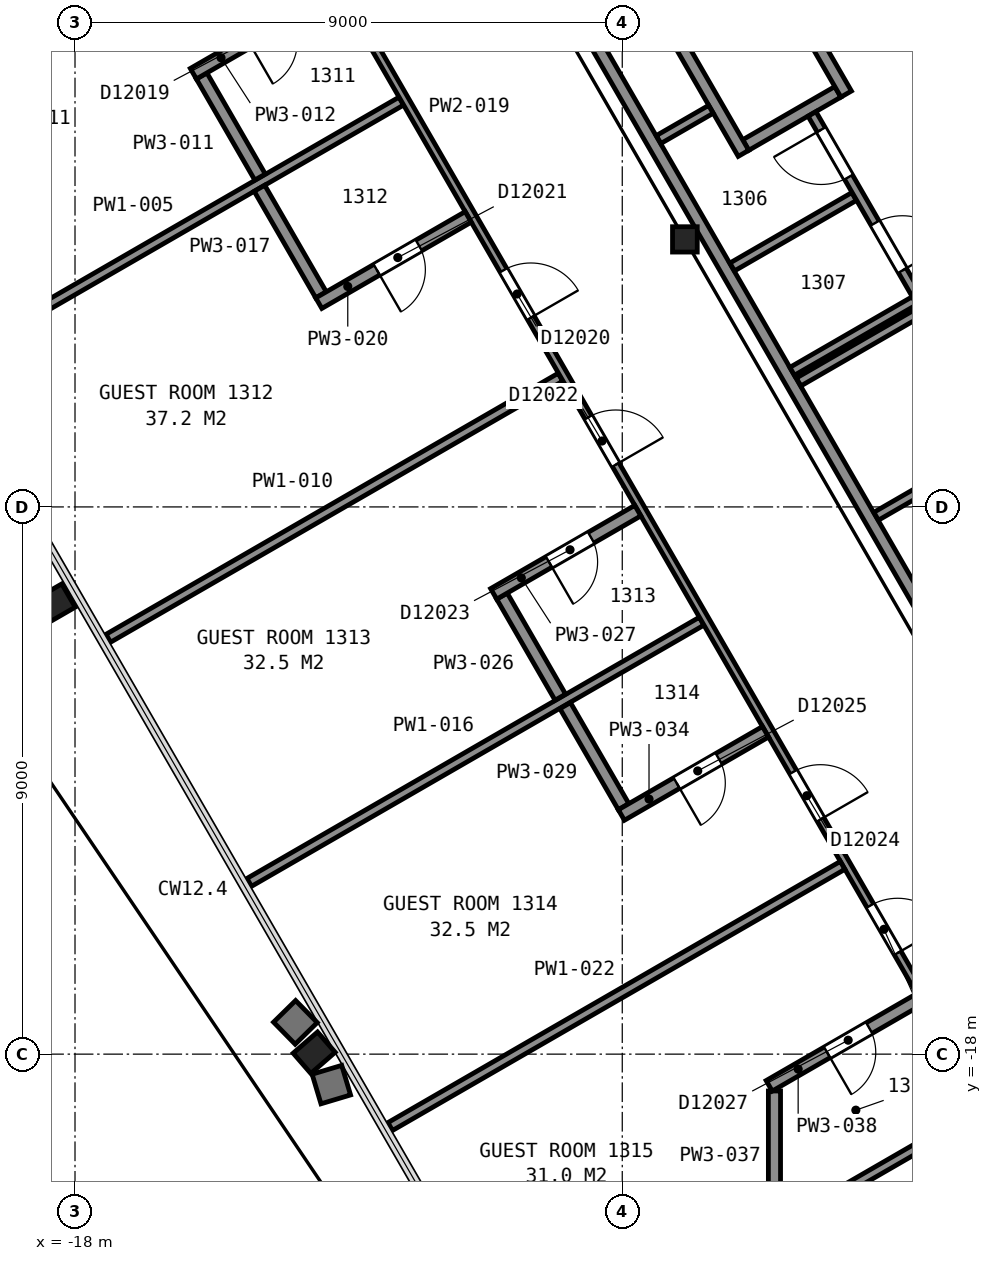
"""IFC4 building model, lengths in metres.
Left out: names, types, materials, properties, quantities, classifications, styles, units other than length and angle.
Written with IfcOpenShell. Run it as: python <this file> out.ifc"""

import sys

from ifc_helpers import new_model, si_unit, direction, frame, frame_2d, origin, origin_2d, place, context, subcontext, project, spatial, rectangle, i_section, extrude, element, fill, save


model = new_model("IFC4")
c1 = context("Model", 3, precision=1e-05, world=origin(), true_north=direction((0.0, 1.0)))
c2 = subcontext(c1, "Body", "Model", "MODEL_VIEW")
j1 = project(units=[si_unit("LENGTHUNIT", "METRE"), si_unit("PLANEANGLEUNIT", "RADIAN")], contexts=[c1])
p1 = place(None, origin())
s1 = spatial("IfcSite", under=j1, at=p1, CompositionType="ELEMENT")
p2 = place(p1, origin())
s2 = spatial("IfcBuilding", under=s1, at=p2, CompositionType="ELEMENT")
p3 = place(p2, frame((0.0, 0.0, 62.0)))
s3 = spatial("IfcBuildingStorey", under=s2, at=p3, CompositionType="ELEMENT", Elevation=62.0)
p4 = place(p3, frame((-18.252, -10.541, 0.025), z_axis=(-0.072028126388, -0.041530965358, 0.996537569751), x_axis=(-0.499785583529, 0.866149161394, -2.670081e-05)))
e1 = element("IfcColumn", 1, at=p4, inside=s3, PredefinedType="COLUMN", context=c2, shape_type="SweptSolid", body=[
    extrude(i_section(OverallWidth=0.442, OverallDepth=0.531, WebThickness=0.066, FlangeThickness=0.106, FilletRadius=0.015, at=origin_2d()), origin(), (0.0, 0.0, 1.0), 3.562),
])
p5 = place(p3, frame((-13.992, -17.911, 0.025), z_axis=(-0.063660519168, -0.055368890729, 0.996434455566), x_axis=(-0.500027144747, 0.865858806591, 0.01616729924)))
e2 = element("IfcColumn", 2, at=p5, inside=s3, PredefinedType="COLUMN", context=c2, shape_type="SweptSolid", body=[
    extrude(i_section(OverallWidth=0.442, OverallDepth=0.531, WebThickness=0.066, FlangeThickness=0.106, FilletRadius=0.015, at=origin_2d()), origin(), (0.0, 0.0, 1.0), 3.563),
])
p6 = place(p3, frame((-7.97, -4.6, 0.0), z_axis=(0.0, 0.0, 1.0), x_axis=(1.0, 0.0, 0.0)))
e3 = element("IfcColumn", 3, at=p6, inside=s3, PredefinedType="COLUMN", context=c2, shape_type="SweptSolid", body=[
    extrude(i_section(OverallWidth=0.406, OverallDepth=0.417, WebThickness=0.03, FlangeThickness=0.048, FilletRadius=0.015, at=origin_2d()), origin(), (0.0, 0.0, 1.0), 3.6),
])
p7 = place(p3, frame((-6.97, -3.048, 0.0), z_axis=(0.0, 0.0, 1.0), x_axis=(0.866036909293, 0.499980071345, 0.0)))
e4 = element("IfcWall", 4, at=p7, inside=s3, PredefinedType="PARTITIONING", context=c2, shape_type="SweptSolid", body=[
    extrude(rectangle(XDim=1.75, YDim=0.2, at=frame_2d((0.875, 0.0))), origin(), (0.0, 0.0, 1.0), 3.6),
])
p8 = place(p3, frame((-5.318, -2.21, 0.0), z_axis=(0.0, 0.0, 1.0), x_axis=(-0.499938297808, 0.866061024631, 0.0)))
e5 = element("IfcWall", 5, at=p8, inside=s3, PredefinedType="PARTITIONING", context=c2, shape_type="SweptSolid", body=[
    extrude(rectangle(XDim=2.35, YDim=0.2, at=frame_2d((1.175, 0.0))), origin(), (0.0, 0.0, 1.0), 3.6),
])
p9 = place(p3, frame((-7.006, -3.185, 0.0), z_axis=(0.0, 0.0, 1.0), x_axis=(-0.499990435942, 0.866030925526, 0.0)))
e6 = element("IfcWall", 6, at=p9, inside=s3, PredefinedType="PARTITIONING", context=c2, shape_type="SweptSolid", body=[
    extrude(rectangle(XDim=2.55, YDim=0.2, at=frame_2d((1.275, 0.0))), origin(), (0.0, 0.0, 1.0), 3.6),
])
p10 = place(p3, frame((-13.664, 5.946, 0.0), z_axis=(0.0, 0.0, 1.0), x_axis=(0.499994327219, -0.866028678941, 0.0)))
e7 = element("IfcWall", 7, at=p10, inside=s3, PredefinedType="PARTITIONING", context=c2, shape_type="SweptSolid", body=[
    extrude(rectangle(XDim=23.968, YDim=0.2, at=frame_2d((11.984, 0.0))), origin(), (0.0, 0.0, 1.0), 3.35),
])
p11 = place(p3, frame((-8.402, -2.958, 0.0), z_axis=(0.0, 0.0, 1.0), x_axis=(0.866025935826, 0.499999078476, 0.0)))
e8 = element("IfcWall", 8, at=p11, inside=s3, PredefinedType="PARTITIONING", context=c2, shape_type="SweptSolid", body=[
    extrude(rectangle(XDim=0.993, YDim=0.15, at=frame_2d((0.497, 0.0))), origin(), (0.0, 0.0, 1.0), 3.35),
])
p12 = place(p3, frame((-7.192, -5.053, 0.0), z_axis=(0.0, 0.0, 1.0), x_axis=(0.865851878631, 0.500300434011, 0.0)))
e9 = element("IfcWall", 9, at=p12, inside=s3, PredefinedType="PARTITIONING", context=c2, shape_type="SweptSolid", body=[
    extrude(rectangle(XDim=2.315, YDim=0.15, at=frame_2d((1.158, 0.0))), origin(), (0.0, 0.0, 1.0), 3.35),
])
p13 = place(p3, frame((-6.206, -6.77, 0.0), z_axis=(0.0, 0.0, 1.0), x_axis=(0.865998469481, 0.500046648681, 0.0)))
e10 = element("IfcWall", 10, at=p13, inside=s3, PredefinedType="PARTITIONING", context=c2, shape_type="SweptSolid", body=[
    extrude(rectangle(XDim=2.325, YDim=0.15, at=frame_2d((1.163, 0.0))), origin(), (0.0, 0.0, 1.0), 3.35),
])
p14 = place(p3, frame((-6.1, -6.946, 0.0), z_axis=(0.0, 0.0, 1.0), x_axis=(0.866038200431, 0.499977834903, 0.0)))
e11 = element("IfcWall", 11, at=p14, inside=s3, PredefinedType="PARTITIONING", context=c2, shape_type="SweptSolid", body=[
    extrude(rectangle(XDim=4.22, YDim=0.15, at=frame_2d((2.11, 0.0))), origin(), (0.0, 0.0, 1.0), 3.35),
])
p15 = place(p3, frame((-4.091, -5.635, 0.0), z_axis=(0.0, 0.0, 1.0), x_axis=(-0.499948934428, 0.866054884499, 0.0)))
e12 = element("IfcWall", 12, at=p15, inside=s3, PredefinedType="PARTITIONING", context=c2, shape_type="SweptSolid", body=[
    extrude(rectangle(XDim=3.577, YDim=0.15, at=frame_2d((1.789, 0.0))), origin(), (0.0, 0.0, 1.0), 3.35),
])
p16 = place(p15, frame((2.377, 0.0, 0.0)))
e13 = element("IfcOpeningElement", 13, at=p16, cuts=e12, PredefinedType="OPENING", context=c2, shape_type="SweptSolid", body=[
    extrude(rectangle(XDim=0.9, YDim=2.1, at=frame_2d((0.45, 1.05))), frame((0.0, 0.085, 0.0), z_axis=(0.0, -1.0, 0.0), x_axis=(1.0, 0.0, 0.0)), (0.0, 0.0, 1.0), 0.17),
])
p17 = place(p15, frame((0.605, 0.0, 0.0)))
e14 = element("IfcOpeningElement", 14, at=p17, cuts=e12, PredefinedType="OPENING", context=c2, shape_type="SweptSolid", body=[
    extrude(rectangle(XDim=0.9, YDim=2.1, at=frame_2d((0.45, 1.05))), frame((0.0, 0.085, 0.0), z_axis=(0.0, -1.0, 0.0), x_axis=(1.0, 0.0, 0.0)), (0.0, 0.0, 1.0), 0.17),
])
p18 = place(p3, frame((-4.825, -9.154, 0.0), z_axis=(0.0, 0.0, 1.0), x_axis=(0.866023738697, 0.500002884005, 0.0)))
e15 = element("IfcWall", 15, at=p18, inside=s3, PredefinedType="PARTITIONING", context=c2, shape_type="SweptSolid", body=[
    extrude(rectangle(XDim=4.22, YDim=0.15, at=frame_2d((2.11, 0.0))), origin(), (0.0, 0.0, 1.0), 3.35),
])
p19 = place(p18, frame((1.595, 0.0, 0.0)))
e16 = element("IfcOpeningElement", 16, at=p19, cuts=e15, PredefinedType="OPENING", context=c2, shape_type="SweptSolid", body=[
    extrude(rectangle(XDim=0.9, YDim=2.1, at=frame_2d((0.45, 1.05))), frame((0.0, 0.085, 0.0), z_axis=(0.0, -1.0, 0.0), x_axis=(1.0, 0.0, 0.0)), (0.0, 0.0, 1.0), 0.17),
])
p20 = place(p3, frame((-22.392, -2.605, 0.0), z_axis=(0.0, 0.0, 1.0), x_axis=(0.866031705461, 0.499989085017, 0.0)))
e17 = element("IfcWall", 17, at=p20, inside=s3, PredefinedType="PARTITIONING", context=c2, shape_type="SweptSolid", body=[
    extrude(rectangle(XDim=8.587, YDim=0.15, at=frame_2d((4.293, 0.0))), origin(), (0.0, 0.0, 1.0), 2.613),
])
p21 = place(p3, frame((-20.073, -6.621, 0.0), z_axis=(0.0, 0.0, 1.0), x_axis=(0.866029425019, 0.499993034952, 0.0)))
e18 = element("IfcWall", 18, at=p21, inside=s3, PredefinedType="PARTITIONING", context=c2, shape_type="SweptSolid", body=[
    extrude(rectangle(XDim=8.591, YDim=0.15, at=frame_2d((4.296, 0.0))), origin(), (0.0, 0.0, 1.0), 2.613),
])
p22 = place(p3, frame((-17.453, -11.16, 0.0), z_axis=(0.0, 0.0, 1.0), x_axis=(0.866031705461, 0.499989085017, 0.0)))
e19 = element("IfcWall", 19, at=p22, inside=s3, PredefinedType="PARTITIONING", context=c2, shape_type="SweptSolid", body=[
    extrude(rectangle(XDim=8.587, YDim=0.15, at=frame_2d((4.293, 0.0))), origin(), (0.0, 0.0, 1.0), 2.613),
])
p23 = place(p3, frame((-15.917, -1.912, 0.0), z_axis=(0.0, 0.0, 1.0), x_axis=(0.499913221443, -0.866075499611, 0.0)))
e20 = element("IfcWall", 20, at=p23, inside=s3, PredefinedType="PARTITIONING", context=c2, shape_type="SweptSolid", body=[
    extrude(rectangle(XDim=1.92, YDim=0.2, at=frame_2d((0.96, 0.0))), origin(), (0.0, 0.0, 1.0), 2.613),
])
p24 = place(p3, frame((-13.688, -0.509, 0.0), z_axis=(0.0, 0.0, 1.0), x_axis=(-0.866012976267, -0.500021524473, 0.0)))
e21 = element("IfcWall", 21, at=p24, inside=s3, PredefinedType="PARTITIONING", context=c2, shape_type="SweptSolid", body=[
    extrude(rectangle(XDim=2.732, YDim=0.2, at=frame_2d((1.366, 0.0))), origin(), (0.0, 0.0, 1.0), 2.613),
])
p25 = place(p24, frame((0.882, 0.0, 0.0)))
e22 = element("IfcOpeningElement", 22, at=p25, cuts=e21, PredefinedType="OPENING", context=c2, shape_type="SweptSolid", body=[
    extrude(rectangle(XDim=0.8, YDim=2.1, at=frame_2d((0.4, 1.05))), frame((0.0, 0.11, 0.0), z_axis=(0.0, -1.0, 0.0), x_axis=(1.0, 0.0, 0.0)), (0.0, 0.0, 1.0), 0.22),
])
p26 = place(p3, frame((-15.135, -15.175, 0.0), z_axis=(0.0, 0.0, 1.0), x_axis=(0.866024224461, 0.500002042643, 0.0)))
e23 = element("IfcWall", 23, at=p26, inside=s3, PredefinedType="PARTITIONING", context=c2, shape_type="SweptSolid", body=[
    extrude(rectangle(XDim=8.592, YDim=0.15, at=frame_2d((4.296, 0.0))), origin(), (0.0, 0.0, 1.0), 2.613),
])
p27 = place(p3, frame((-14.967, -3.759, 0.0), z_axis=(0.0, 0.0, 1.0), x_axis=(0.500042536776, -0.866000843773, 0.0)))
e24 = element("IfcWall", 24, at=p27, inside=s3, PredefinedType="PARTITIONING", context=c2, shape_type="SweptSolid", body=[
    extrude(rectangle(XDim=2.025, YDim=0.2, at=frame_2d((1.012, 0.0))), origin(), (0.0, 0.0, 1.0), 2.613),
])
p28 = place(p3, frame((-3.766, -17.558, 0.0), z_axis=(0.0, 0.0, 1.0), x_axis=(-0.500008349927, 0.866020582898, 0.0)))
e25 = element("IfcWall", 25, at=p28, inside=s3, PredefinedType="PARTITIONING", context=c2, shape_type="SweptSolid", body=[
    extrude(rectangle(XDim=22.496, YDim=0.125, at=frame_2d((11.248, 0.0))), origin(), (0.0, 0.0, 1.0), 2.613),
])
p29 = place(p28, frame((20.563, 0.0, 0.0)))
e26 = element("IfcOpeningElement", 26, at=p29, cuts=e25, PredefinedType="OPENING", context=c2, shape_type="SweptSolid", body=[
    extrude(rectangle(XDim=0.9, YDim=2.1, at=frame_2d((0.45, 1.05))), frame((0.0, 0.073, 0.0), z_axis=(0.0, -1.0, 0.0), x_axis=(1.0, 0.0, 0.0)), (0.0, 0.0, 1.0), 0.145),
])
p30 = place(p28, frame((13.476, 0.0, 0.0)))
e27 = element("IfcOpeningElement", 27, at=p30, cuts=e25, PredefinedType="OPENING", context=c2, shape_type="SweptSolid", body=[
    extrude(rectangle(XDim=0.9, YDim=2.1, at=frame_2d((0.45, 1.05))), frame((0.0, 0.073, 0.0), z_axis=(0.0, -1.0, 0.0), x_axis=(1.0, 0.0, 0.0)), (0.0, 0.0, 1.0), 0.145),
])
p31 = place(p28, frame((10.684, 0.0, 0.0)))
e28 = element("IfcOpeningElement", 28, at=p31, cuts=e25, PredefinedType="OPENING", context=c2, shape_type="SweptSolid", body=[
    extrude(rectangle(XDim=0.9, YDim=2.1, at=frame_2d((0.45, 1.05))), frame((0.0, 0.073, 0.0), z_axis=(0.0, -1.0, 0.0), x_axis=(1.0, 0.0, 0.0)), (0.0, 0.0, 1.0), 0.145),
])
p32 = place(p28, frame((3.948, 0.0, 0.0)))
e29 = element("IfcOpeningElement", 29, at=p32, cuts=e25, PredefinedType="OPENING", context=c2, shape_type="SweptSolid", body=[
    extrude(rectangle(XDim=0.9, YDim=2.1, at=frame_2d((0.45, 1.05))), frame((0.0, 0.073, 0.0), z_axis=(0.0, -1.0, 0.0), x_axis=(1.0, 0.0, 0.0)), (0.0, 0.0, 1.0), 0.145),
])
p33 = place(p28, frame((1.411, 0.0, 0.0)))
e30 = element("IfcOpeningElement", 30, at=p33, cuts=e25, PredefinedType="OPENING", context=c2, shape_type="SweptSolid", body=[
    extrude(rectangle(XDim=0.9, YDim=2.1, at=frame_2d((0.45, 1.05))), frame((0.0, 0.073, 0.0), z_axis=(0.0, -1.0, 0.0), x_axis=(1.0, 0.0, 0.0)), (0.0, 0.0, 1.0), 0.145),
])
p34 = place(p3, frame((-13.991, -5.649, 0.0), z_axis=(0.0, 0.0, 1.0), x_axis=(0.866048046904, 0.499960778915, 0.0)))
e31 = element("IfcWall", 31, at=p34, inside=s3, PredefinedType="PARTITIONING", context=c2, shape_type="SweptSolid", body=[
    extrude(rectangle(XDim=2.838, YDim=0.2, at=frame_2d((1.419, 0.0))), origin(), (0.0, 0.0, 1.0), 2.613),
])
p35 = place(p34, frame((1.1, 0.0, 0.0)))
e32 = element("IfcOpeningElement", 32, at=p35, cuts=e31, PredefinedType="OPENING", context=c2, shape_type="SweptSolid", body=[
    extrude(rectangle(XDim=0.8, YDim=2.1, at=frame_2d((0.4, 1.05))), frame((0.0, 0.11, 0.0), z_axis=(0.0, -1.0, 0.0), x_axis=(1.0, 0.0, 0.0)), (0.0, 0.0, 1.0), 0.22),
])
p36 = place(p3, frame((-12.816, -19.191, 0.0), z_axis=(0.0, 0.0, 1.0), x_axis=(0.866034625887, 0.499984026509, 0.0)))
e33 = element("IfcWall", 33, at=p36, inside=s3, PredefinedType="PARTITIONING", context=c2, shape_type="SweptSolid", body=[
    extrude(rectangle(XDim=8.591, YDim=0.15, at=frame_2d((4.295, 0.0))), origin(), (0.0, 0.0, 1.0), 2.613),
])
p37 = place(p3, frame((-10.978, -10.467, 0.0), z_axis=(0.0, 0.0, 1.0), x_axis=(0.499832553123, -0.866122057702, 0.0)))
e34 = element("IfcWall", 34, at=p37, inside=s3, PredefinedType="PARTITIONING", context=c2, shape_type="SweptSolid", body=[
    extrude(rectangle(XDim=1.92, YDim=0.2, at=frame_2d((0.96, 0.0))), origin(), (0.0, 0.0, 1.0), 2.613),
])
p38 = place(p3, frame((-8.744, -9.061, 0.0), z_axis=(0.0, 0.0, 1.0), x_axis=(-0.866005850709, -0.50003386539, 0.0)))
e35 = element("IfcWall", 35, at=p38, inside=s3, PredefinedType="PARTITIONING", context=c2, shape_type="SweptSolid", body=[
    extrude(rectangle(XDim=2.737, YDim=0.2, at=frame_2d((1.369, 0.0))), origin(), (0.0, 0.0, 1.0), 2.613),
])
p39 = place(p38, frame((0.887, 0.0, 0.0)))
e36 = element("IfcOpeningElement", 36, at=p39, cuts=e35, PredefinedType="OPENING", context=c2, shape_type="SweptSolid", body=[
    extrude(rectangle(XDim=0.8, YDim=2.1, at=frame_2d((0.4, 1.05))), frame((0.0, 0.11, 0.0), z_axis=(0.0, -1.0, 0.0), x_axis=(1.0, 0.0, 0.0)), (0.0, 0.0, 1.0), 0.22),
])
p40 = place(p3, frame((-10.498, -23.206, 0.0), z_axis=(0.0, 0.0, 1.0), x_axis=(0.866003165052, 0.500038516636, 0.0)))
e37 = element("IfcWall", 37, at=p40, inside=s3, PredefinedType="PARTITIONING", context=c2, shape_type="SweptSolid", body=[
    extrude(rectangle(XDim=7.623, YDim=0.15, at=frame_2d((3.811, 0.0))), origin(), (0.0, 0.0, 1.0), 2.613),
])
p41 = place(p3, frame((-9.938, -12.268, 0.0), z_axis=(0.0, 0.0, 1.0), x_axis=(0.500269123289, -0.865869969617, 0.0)))
e38 = element("IfcWall", 38, at=p41, inside=s3, PredefinedType="PARTITIONING", context=c2, shape_type="SweptSolid", body=[
    extrude(rectangle(XDim=1.92, YDim=0.2, at=frame_2d((0.96, 0.0))), origin(), (0.0, 0.0, 1.0), 2.613),
])
p42 = place(p3, frame((-9.015, -14.067, 0.0), z_axis=(0.0, 0.0, 1.0), x_axis=(0.866028150195, 0.499995243048, 0.0)))
e39 = element("IfcWall", 39, at=p42, inside=s3, PredefinedType="PARTITIONING", context=c2, shape_type="SweptSolid", body=[
    extrude(rectangle(XDim=2.737, YDim=0.2, at=frame_2d((1.369, 0.0))), origin(), (0.0, 0.0, 1.0), 2.613),
])
p43 = place(p42, frame((1.05, 0.0, 0.0)))
e40 = element("IfcOpeningElement", 40, at=p43, cuts=e39, PredefinedType="OPENING", context=c2, shape_type="SweptSolid", body=[
    extrude(rectangle(XDim=0.8, YDim=2.1, at=frame_2d((0.4, 1.05))), frame((0.0, 0.11, 0.0), z_axis=(0.0, -1.0, 0.0), x_axis=(1.0, 0.0, 0.0)), (0.0, 0.0, 1.0), 0.22),
])
p44 = place(p3, frame((-6.497, -20.752, 0.0), z_axis=(0.0, 0.0, 1.0), x_axis=(0.0, 1.0, 0.0)))
e41 = element("IfcWall", 41, at=p44, inside=s3, PredefinedType="PARTITIONING", context=c2, shape_type="SweptSolid", body=[
    extrude(rectangle(XDim=2.146, YDim=0.2, at=frame_2d((1.073, 0.0))), origin(), (0.0, 0.0, 1.0), 2.613),
])
p45 = place(p3, frame((-4.108, -17.091, 0.0), z_axis=(0.0, 0.0, 1.0), x_axis=(-0.865942343511, -0.500143837025, 0.0)))
e42 = element("IfcWall", 42, at=p45, inside=s3, PredefinedType="PARTITIONING", context=c2, shape_type="SweptSolid", body=[
    extrude(rectangle(XDim=2.859, YDim=0.2, at=frame_2d((1.429, 0.0))), origin(), (0.0, 0.0, 1.0), 2.613),
])
p46 = place(p45, frame((0.959, 0.0, 0.0)))
e43 = element("IfcOpeningElement", 43, at=p46, cuts=e42, PredefinedType="OPENING", context=c2, shape_type="SweptSolid", body=[
    extrude(rectangle(XDim=0.8, YDim=2.1, at=frame_2d((0.4, 1.05))), frame((0.0, 0.11, 0.0), z_axis=(0.0, -1.0, 0.0), x_axis=(1.0, 0.0, 0.0)), (0.0, 0.0, 1.0), 0.22),
])
p47 = place(p16, origin())
e44 = element("IfcDoor", 44, at=p47, inside=s3, OperationType="SINGLE_SWING_RIGHT", PredefinedType="DOOR", context=c2, shape_type="SweptSolid", body=[
    extrude(rectangle(XDim=0.9, YDim=2.1, at=frame_2d((0.45, 1.05))), frame((0.0, 0.025, 0.0), z_axis=(0.0, -1.0, 0.0), x_axis=(1.0, 0.0, 0.0)), (0.0, 0.0, 1.0), 0.05),
])
fill(e13, e44)
p48 = place(p17, origin())
e45 = element("IfcDoor", 45, at=p48, inside=s3, OperationType="SINGLE_SWING_LEFT", PredefinedType="DOOR", context=c2, shape_type="SweptSolid", body=[
    extrude(rectangle(XDim=0.9, YDim=2.1, at=frame_2d((0.45, 1.05))), frame((0.0, 0.025, 0.0), z_axis=(0.0, -1.0, 0.0), x_axis=(1.0, 0.0, 0.0)), (0.0, 0.0, 1.0), 0.05),
])
fill(e14, e45)
p49 = place(p30, origin())
e46 = element("IfcDoor", 46, at=p49, inside=s3, OperationType="SINGLE_SWING_LEFT", PredefinedType="DOOR", context=c2, shape_type="SweptSolid", body=[
    extrude(rectangle(XDim=0.9, YDim=2.1, at=frame_2d((0.45, 1.05))), frame((0.0, 0.025, 0.0), z_axis=(0.0, -1.0, 0.0), x_axis=(1.0, 0.0, 0.0)), (0.0, 0.0, 1.0), 0.05),
])
fill(e27, e46)
p50 = place(p31, origin())
e47 = element("IfcDoor", 47, at=p50, inside=s3, OperationType="SINGLE_SWING_LEFT", PredefinedType="DOOR", context=c2, shape_type="SweptSolid", body=[
    extrude(rectangle(XDim=0.9, YDim=2.1, at=frame_2d((0.45, 1.05))), frame((0.0, 0.025, 0.0), z_axis=(0.0, -1.0, 0.0), x_axis=(1.0, 0.0, 0.0)), (0.0, 0.0, 1.0), 0.05),
])
fill(e28, e47)
p51 = place(p32, origin())
e48 = element("IfcDoor", 48, at=p51, inside=s3, OperationType="SINGLE_SWING_LEFT", PredefinedType="DOOR", context=c2, shape_type="SweptSolid", body=[
    extrude(rectangle(XDim=0.9, YDim=2.1, at=frame_2d((0.45, 1.05))), frame((0.0, 0.025, 0.0), z_axis=(0.0, -1.0, 0.0), x_axis=(1.0, 0.0, 0.0)), (0.0, 0.0, 1.0), 0.05),
])
fill(e29, e48)
p52 = place(p33, origin())
e49 = element("IfcDoor", 49, at=p52, inside=s3, OperationType="SINGLE_SWING_LEFT", PredefinedType="DOOR", context=c2, shape_type="SweptSolid", body=[
    extrude(rectangle(XDim=0.9, YDim=2.1, at=frame_2d((0.45, 1.05))), frame((0.0, 0.025, 0.0), z_axis=(0.0, -1.0, 0.0), x_axis=(1.0, 0.0, 0.0)), (0.0, 0.0, 1.0), 0.05),
])
fill(e30, e49)
p53 = place(p35, origin())
e50 = element("IfcDoor", 50, at=p53, inside=s3, OperationType="SINGLE_SWING_LEFT", PredefinedType="DOOR", context=c2, shape_type="SweptSolid", body=[
    extrude(rectangle(XDim=0.8, YDim=2.1, at=frame_2d((0.4, 1.05))), frame((0.0, 0.025, 0.0), z_axis=(0.0, -1.0, 0.0), x_axis=(1.0, 0.0, 0.0)), (0.0, 0.0, 1.0), 0.05),
])
fill(e32, e50)
p54 = place(p39, origin())
e51 = element("IfcDoor", 51, at=p54, inside=s3, OperationType="SINGLE_SWING_RIGHT", PredefinedType="DOOR", context=c2, shape_type="SweptSolid", body=[
    extrude(rectangle(XDim=0.8, YDim=2.1, at=frame_2d((0.4, 1.05))), frame((0.0, 0.025, 0.0), z_axis=(0.0, -1.0, 0.0), x_axis=(1.0, 0.0, 0.0)), (0.0, 0.0, 1.0), 0.05),
])
fill(e36, e51)
p55 = place(p43, origin())
e52 = element("IfcDoor", 52, at=p55, inside=s3, OperationType="SINGLE_SWING_LEFT", PredefinedType="DOOR", context=c2, shape_type="SweptSolid", body=[
    extrude(rectangle(XDim=0.8, YDim=2.1, at=frame_2d((0.4, 1.05))), frame((0.0, 0.025, 0.0), z_axis=(0.0, -1.0, 0.0), x_axis=(1.0, 0.0, 0.0)), (0.0, 0.0, 1.0), 0.05),
])
fill(e40, e52)
p56 = place(p46, origin())
e53 = element("IfcDoor", 53, at=p56, inside=s3, OperationType="SINGLE_SWING_RIGHT", PredefinedType="DOOR", context=c2, shape_type="SweptSolid", body=[
    extrude(rectangle(XDim=0.8, YDim=2.1, at=frame_2d((0.4, 1.05))), frame((0.0, 0.025, 0.0), z_axis=(0.0, -1.0, 0.0), x_axis=(1.0, 0.0, 0.0)), (0.0, 0.0, 1.0), 0.05),
])
fill(e43, e53)
save(model, sys.argv[1])
